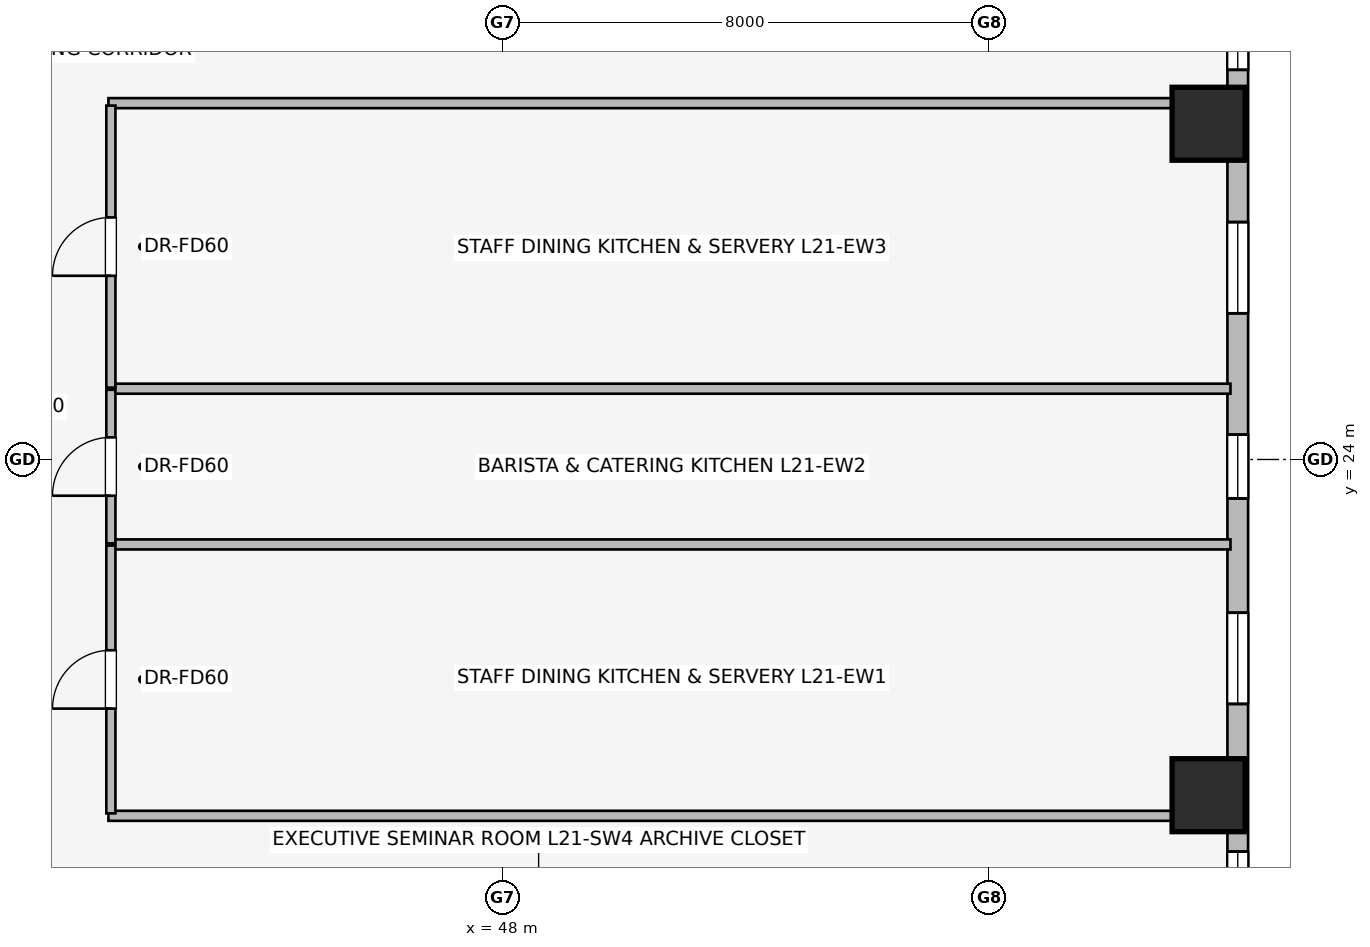
"""IFC4 building model, lengths in metres.
Left out: names, types, materials, properties, quantities, classifications, styles, units other than length and angle.
Written with IfcOpenShell. Run it as: python <this file> out.ifc"""

import sys

from ifc_helpers import new_model, si_unit, direction, frame, frame_2d, origin, origin_2d, place, context, subcontext, project, spatial, rectangle, extrude, element, fill, save


model = new_model("IFC4")
c1 = context("Model", 3, precision=1e-05, world=origin(), true_north=direction((0.0, 1.0)))
c2 = subcontext(c1, "Body", "Model", "MODEL_VIEW")
j1 = project(units=[si_unit("LENGTHUNIT", "METRE"), si_unit("PLANEANGLEUNIT", "RADIAN")], contexts=[c1])
p1 = place(None, origin())
s1 = spatial("IfcSite", under=j1, at=p1, CompositionType="ELEMENT")
p2 = place(p1, origin())
s2 = spatial("IfcBuilding", under=s1, at=p2, CompositionType="ELEMENT")
p3 = place(p2, frame((0.0, 0.0, 81.75)))
s3 = spatial("IfcBuildingStorey", under=s2, at=p3, CompositionType="ELEMENT", Elevation=81.75)
for number, where, z_axis, x_axis in (
    (1, (59.613, 18.479, 0.0), (0.0, 0.0, 1.0), (1.0, 0.0, 0.0)),
    (2, (59.613, 29.521, 0.0), (0.0, 0.0, 1.0), (1.0, 0.0, 0.0)),
):
    element("IfcColumn", number, at=place(p3, frame(where, z_axis=z_axis, x_axis=x_axis)), inside=s3, PredefinedType="COLUMN", context=c2, shape_type="SweptSolid", body=[
        extrude(rectangle(XDim=1.2, YDim=1.2, at=origin_2d()), origin(), (0.0, 0.0, 1.0), 3.65),
    ])
p4 = place(p3, frame((60.093, 33.202, 0.0), z_axis=(0.0, 0.0, 1.0), x_axis=(0.0, -1.0, 0.0)))
e3 = element("IfcWall", 3, at=p4, inside=s3, PredefinedType="STANDARD", context=c2, shape_type="SweptSolid", body=[
    extrude(rectangle(XDim=18.404, YDim=0.34, at=frame_2d((9.202, 0.0))), origin(), (0.0, 0.0, 1.0), 2.684),
])
p5 = place(p4, frame((1.744, 0.0, 0.75)))
e4 = element("IfcOpeningElement", 4, at=p5, cuts=e3, PredefinedType="OPENING", context=c2, shape_type="SweptSolid", body=[
    extrude(rectangle(XDim=1.05, YDim=1.4, at=frame_2d((0.525, 0.7))), frame((0.0, 0.18, 0.0), z_axis=(0.0, -1.0, 0.0), x_axis=(1.0, 0.0, 0.0)), (0.0, 0.0, 1.0), 0.36),
])
p6 = place(p4, frame((5.298, 0.0, 0.75)))
e5 = element("IfcOpeningElement", 5, at=p6, cuts=e3, PredefinedType="OPENING", context=c2, shape_type="SweptSolid", body=[
    extrude(rectangle(XDim=1.5, YDim=1.5, at=frame_2d((0.75, 0.75))), frame((0.0, 0.18, 0.0), z_axis=(0.0, -1.0, 0.0), x_axis=(1.0, 0.0, 0.0)), (0.0, 0.0, 1.0), 0.36),
])
p7 = place(p4, frame((8.793, 0.0, 0.75)))
e6 = element("IfcOpeningElement", 6, at=p7, cuts=e3, PredefinedType="OPENING", context=c2, shape_type="SweptSolid", body=[
    extrude(rectangle(XDim=1.05, YDim=1.4, at=frame_2d((0.525, 0.7))), frame((0.0, 0.18, 0.0), z_axis=(0.0, -1.0, 0.0), x_axis=(1.0, 0.0, 0.0)), (0.0, 0.0, 1.0), 0.36),
])
p8 = place(p4, frame((11.722, 0.0, 0.75)))
e7 = element("IfcOpeningElement", 7, at=p8, cuts=e3, PredefinedType="OPENING", context=c2, shape_type="SweptSolid", body=[
    extrude(rectangle(XDim=1.5, YDim=1.5, at=frame_2d((0.75, 0.75))), frame((0.0, 0.18, 0.0), z_axis=(0.0, -1.0, 0.0), x_axis=(1.0, 0.0, 0.0)), (0.0, 0.0, 1.0), 0.36),
])
p9 = place(p4, frame((15.65, 0.0, 0.75)))
e8 = element("IfcOpeningElement", 8, at=p9, cuts=e3, PredefinedType="OPENING", context=c2, shape_type="SweptSolid", body=[
    extrude(rectangle(XDim=1.05, YDim=1.4, at=frame_2d((0.525, 0.7))), frame((0.0, 0.18, 0.0), z_axis=(0.0, -1.0, 0.0), x_axis=(1.0, 0.0, 0.0)), (0.0, 0.0, 1.0), 0.36),
])
for number, where, z_axis, x_axis in (
    (9, (41.52, 18.14, 0.0), (0.0, 0.0, 1.0), (1.0, 0.0, 0.0)),
    (10, (41.52, 29.86, 0.0), (0.0, 0.0, 1.0), (1.0, 0.0, 0.0)),
):
    element("IfcWall", number, at=place(p3, frame(where, z_axis=z_axis, x_axis=x_axis)), inside=s3, PredefinedType="PARTITIONING", context=c2, shape_type="SweptSolid", body=[
        extrude(rectangle(XDim=18.453, YDim=0.165, at=frame_2d((9.227, 0.0))), origin(), (0.0, 0.0, 1.0), 3.39),
    ])
for number, where, z_axis, x_axis in (
    (11, (41.59, 22.603, 0.0), (0.0, 0.0, 1.0), (1.0, 0.0, 0.0)),
    (12, (41.59, 25.164, 0.0), (0.0, 0.0, 1.0), (1.0, 0.0, 0.0)),
):
    element("IfcWall", number, at=place(p3, frame(where, z_axis=z_axis, x_axis=x_axis)), inside=s3, PredefinedType="PARTITIONING", context=c2, shape_type="SweptSolid", body=[
        extrude(rectangle(XDim=18.383, YDim=0.165, at=frame_2d((9.191, 0.0))), origin(), (0.0, 0.0, 1.0), 3.39),
    ])
p10 = place(p3, frame((41.56, 18.18, 0.0), z_axis=(0.0, 0.0, 1.0), x_axis=(0.0, 1.0, 0.0)))
e13 = element("IfcWall", 13, at=p10, inside=s3, PredefinedType="PARTITIONING", context=c2, shape_type="SweptSolid", body=[
    extrude(rectangle(XDim=4.405, YDim=0.15, at=frame_2d((2.203, 0.0))), origin(), (0.0, 0.0, 1.0), 3.39),
])
p11 = place(p10, frame((1.723, 0.0, 0.0)))
e14 = element("IfcOpeningElement", 14, at=p11, cuts=e13, PredefinedType="OPENING", context=c2, shape_type="SweptSolid", body=[
    extrude(rectangle(XDim=0.96, YDim=2.0, at=frame_2d((0.48, 1.0))), frame((0.0, 0.085, 0.0), z_axis=(0.0, -1.0, 0.0), x_axis=(1.0, 0.0, 0.0)), (0.0, 0.0, 1.0), 0.17),
])
p12 = place(p3, frame((41.56, 22.621, 0.0), z_axis=(0.0, 0.0, 1.0), x_axis=(0.0, 1.0, 0.0)))
e15 = element("IfcWall", 15, at=p12, inside=s3, PredefinedType="PARTITIONING", context=c2, shape_type="SweptSolid", body=[
    extrude(rectangle(XDim=2.525, YDim=0.15, at=frame_2d((1.262, 0.0))), origin(), (0.0, 0.0, 1.0), 3.39),
])
p13 = place(p12, frame((0.783, 0.0, 0.0)))
e16 = element("IfcOpeningElement", 16, at=p13, cuts=e15, PredefinedType="OPENING", context=c2, shape_type="SweptSolid", body=[
    extrude(rectangle(XDim=0.96, YDim=2.0, at=frame_2d((0.48, 1.0))), frame((0.0, 0.085, 0.0), z_axis=(0.0, -1.0, 0.0), x_axis=(1.0, 0.0, 0.0)), (0.0, 0.0, 1.0), 0.17),
])
p14 = place(p3, frame((41.56, 25.182, 0.0), z_axis=(0.0, 0.0, 1.0), x_axis=(0.0, 1.0, 0.0)))
e17 = element("IfcWall", 17, at=p14, inside=s3, PredefinedType="PARTITIONING", context=c2, shape_type="SweptSolid", body=[
    extrude(rectangle(XDim=4.638, YDim=0.15, at=frame_2d((2.319, 0.0))), origin(), (0.0, 0.0, 1.0), 3.39),
])
p15 = place(p14, frame((1.839, 0.0, 0.0)))
e18 = element("IfcOpeningElement", 18, at=p15, cuts=e17, PredefinedType="OPENING", context=c2, shape_type="SweptSolid", body=[
    extrude(rectangle(XDim=0.96, YDim=2.0, at=frame_2d((0.48, 1.0))), frame((0.0, 0.085, 0.0), z_axis=(0.0, -1.0, 0.0), x_axis=(1.0, 0.0, 0.0)), (0.0, 0.0, 1.0), 0.17),
])
p16 = place(p5, origin())
e19 = element("IfcWindow", 19, at=p16, inside=s3, PartitioningType="SINGLE_PANEL", PredefinedType="WINDOW", context=c2, shape_type="SweptSolid", body=[
    extrude(rectangle(XDim=1.05, YDim=1.4, at=frame_2d((0.525, 0.7))), frame((0.0, 0.03, 0.0), z_axis=(0.0, -1.0, 0.0), x_axis=(1.0, 0.0, 0.0)), (0.0, 0.0, 1.0), 0.06),
])
fill(e4, e19)
p17 = place(p6, origin())
e20 = element("IfcWindow", 20, at=p17, inside=s3, PartitioningType="SINGLE_PANEL", PredefinedType="WINDOW", context=c2, shape_type="SweptSolid", body=[
    extrude(rectangle(XDim=1.5, YDim=1.5, at=frame_2d((0.75, 0.75))), frame((0.0, 0.03, 0.0), z_axis=(0.0, -1.0, 0.0), x_axis=(1.0, 0.0, 0.0)), (0.0, 0.0, 1.0), 0.06),
])
fill(e5, e20)
p18 = place(p7, origin())
e21 = element("IfcWindow", 21, at=p18, inside=s3, PartitioningType="SINGLE_PANEL", PredefinedType="WINDOW", context=c2, shape_type="SweptSolid", body=[
    extrude(rectangle(XDim=1.05, YDim=1.4, at=frame_2d((0.525, 0.7))), frame((0.0, 0.03, 0.0), z_axis=(0.0, -1.0, 0.0), x_axis=(1.0, 0.0, 0.0)), (0.0, 0.0, 1.0), 0.06),
])
fill(e6, e21)
p19 = place(p8, origin())
e22 = element("IfcWindow", 22, at=p19, inside=s3, PartitioningType="SINGLE_PANEL", PredefinedType="WINDOW", context=c2, shape_type="SweptSolid", body=[
    extrude(rectangle(XDim=1.5, YDim=1.5, at=frame_2d((0.75, 0.75))), frame((0.0, 0.03, 0.0), z_axis=(0.0, -1.0, 0.0), x_axis=(1.0, 0.0, 0.0)), (0.0, 0.0, 1.0), 0.06),
])
fill(e7, e22)
p20 = place(p9, origin())
e23 = element("IfcWindow", 23, at=p20, inside=s3, PartitioningType="SINGLE_PANEL", PredefinedType="WINDOW", context=c2, shape_type="SweptSolid", body=[
    extrude(rectangle(XDim=1.05, YDim=1.4, at=frame_2d((0.525, 0.7))), frame((0.0, 0.03, 0.0), z_axis=(0.0, -1.0, 0.0), x_axis=(1.0, 0.0, 0.0)), (0.0, 0.0, 1.0), 0.06),
])
fill(e8, e23)
p21 = place(p11, origin())
e24 = element("IfcDoor", 24, at=p21, inside=s3, OperationType="SINGLE_SWING_LEFT", PredefinedType="DOOR", context=c2, shape_type="SweptSolid", body=[
    extrude(rectangle(XDim=0.96, YDim=2.0, at=frame_2d((0.48, 1.0))), frame((0.0, 0.025, 0.0), z_axis=(0.0, -1.0, 0.0), x_axis=(1.0, 0.0, 0.0)), (0.0, 0.0, 1.0), 0.05),
])
fill(e14, e24)
p22 = place(p13, origin())
e25 = element("IfcDoor", 25, at=p22, inside=s3, OperationType="SINGLE_SWING_LEFT", PredefinedType="DOOR", context=c2, shape_type="SweptSolid", body=[
    extrude(rectangle(XDim=0.96, YDim=2.0, at=frame_2d((0.48, 1.0))), frame((0.0, 0.025, 0.0), z_axis=(0.0, -1.0, 0.0), x_axis=(1.0, 0.0, 0.0)), (0.0, 0.0, 1.0), 0.05),
])
fill(e16, e25)
p23 = place(p15, origin())
e26 = element("IfcDoor", 26, at=p23, inside=s3, OperationType="SINGLE_SWING_LEFT", PredefinedType="DOOR", context=c2, shape_type="SweptSolid", body=[
    extrude(rectangle(XDim=0.96, YDim=2.0, at=frame_2d((0.48, 1.0))), frame((0.0, 0.025, 0.0), z_axis=(0.0, -1.0, 0.0), x_axis=(1.0, 0.0, 0.0)), (0.0, 0.0, 1.0), 0.05),
])
fill(e18, e26)
save(model, sys.argv[1])
